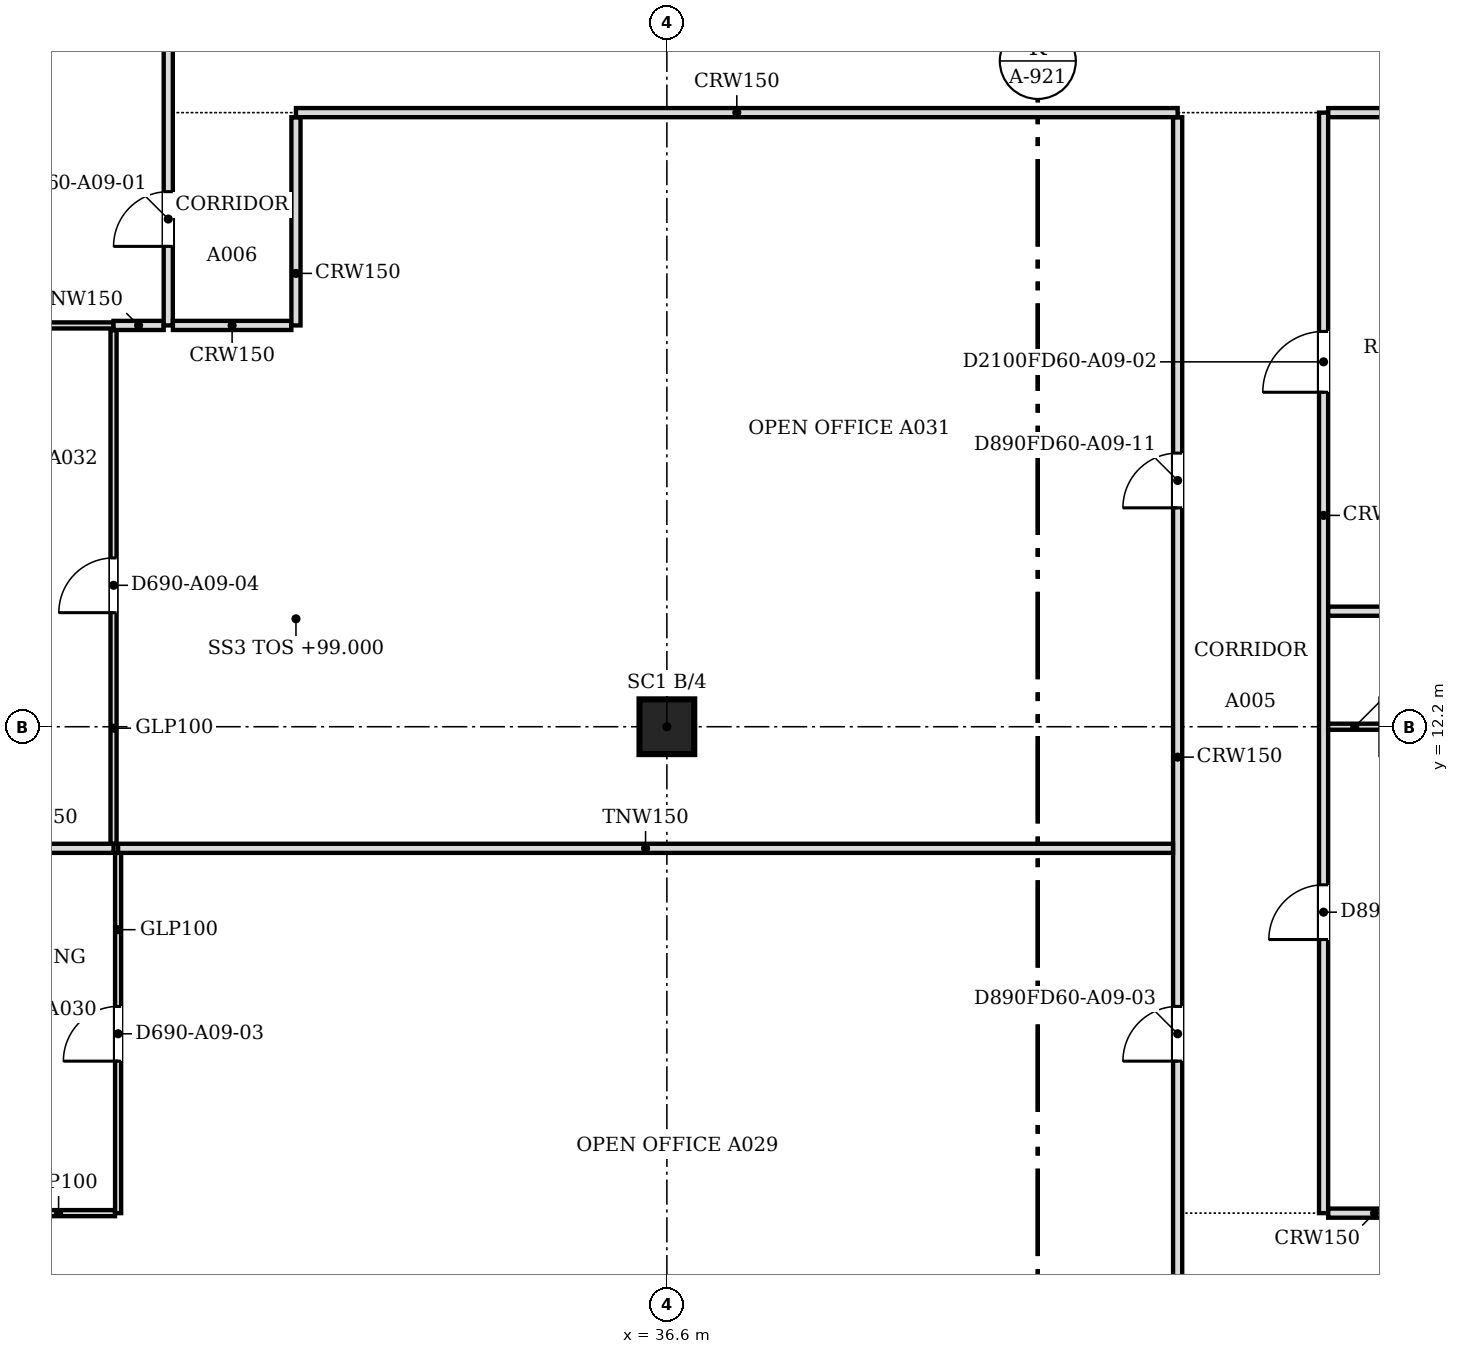
"""IFC4 building model, lengths in metres.
Left out: names, types, materials, properties, quantities, classifications, styles, units other than length and angle.
Written with IfcOpenShell. Run it as: python <this file> out.ifc"""

import sys

from ifc_helpers import new_model, si_unit, direction, frame, frame_2d, origin, origin_2d, place, context, subcontext, project, spatial, polyline, rectangle, outline, extrude, faceted_brep, source, transform, mapped, element, fill, save


model = new_model("IFC4")
c1 = context("Model", 3, precision=1e-05, world=origin(), true_north=direction((0.0, 1.0)))
c2 = subcontext(c1, "Body", "Model", "MODEL_VIEW")
j1 = project(units=[si_unit("LENGTHUNIT", "METRE"), si_unit("PLANEANGLEUNIT", "RADIAN")], contexts=[c1])
p1 = place(None, origin())
s1 = spatial("IfcSite", under=j1, at=p1, CompositionType="ELEMENT")
p2 = place(p1, origin())
s2 = spatial("IfcBuilding", under=s1, at=p2, CompositionType="ELEMENT")
p3 = place(p2, frame((0.0, 0.0, 99.0)))
s3 = spatial("IfcBuildingStorey", under=s2, at=p3, CompositionType="ELEMENT", Elevation=99.0)
p4 = place(p3, frame((36.6, 12.2, 0.0), z_axis=(0.0, 0.0, 1.0), x_axis=(1.0, 0.0, 0.0)))
e1 = element("IfcColumn", 1, at=p4, inside=s3, PredefinedType="COLUMN", context=c2, shape_type="SweptSolid", body=[
    extrude(rectangle(XDim=0.9, YDim=0.9, at=origin_2d()), origin(), (0.0, 0.0, 1.0), 3.6),
])
m1 = source(origin(), c2, "Body", "Brep", [
    faceted_brep([(0.053, -0.25, 0.0), (2.997, -0.25, 3.8), (0.053, -0.25, 7.6), (0.0, -0.25, 7.532), (0.0, -0.25, 0.068), (0.106, 0.25, 7.532), (2.944, 0.25, 3.868), (2.944, 0.25, 3.732), (0.106, 0.25, 0.068), (2.997, 0.0, 3.8), (0.053, 0.0, 0.0), (0.053, 0.0, 7.6)], [[[0, 1, 2, 3, 4]], [[5, 6, 7, 8]], [[8, 7, 9, 1, 0, 10]], [[6, 5, 11, 2, 1, 9]], [[3, 2, 11]], [[10, 0, 4]], [[8, 10, 4, 3, 11, 5]], [[9, 7, 6]]]),
])
p5 = place(p3, frame((25.675, 3.431, -3.8), z_axis=(0.0, 0.0, 1.0), x_axis=(0.707106781187, -0.707106781187, 0.0)))
e2 = element("IfcWall", 2, at=p5, inside=s3, PredefinedType="SOLIDWALL", context=c2, shape_type="MappedRepresentation", body=[
    mapped(m1, transform((0.0, 0.0, 0.0), scale=1.0)),
])
m2 = source(origin(), c2, "Body", "SweptSolid", [
    extrude(outline(polyline([(0.253, 0.666), (2.681, 3.8), (0.253, 6.934), (0.253, 0.666)])), frame((0.0, 0.26, 0.0), z_axis=(0.0, -1.0, 0.0), x_axis=(1.0, 0.0, 0.0)), (0.0, 0.0, 1.0), 0.52),
])
p6 = place(p5, origin())
e3 = element("IfcOpeningElement", 3, at=p6, cuts=e2, PredefinedType="OPENING", context=c2, shape_type="MappedRepresentation", body=[
    mapped(m2, transform((0.0, 0.0, 0.0), scale=1.0)),
])
p7 = place(p2, frame((0.0, 0.0, 102.8)))
s4 = spatial("IfcBuildingStorey", under=s2, at=p7, CompositionType="ELEMENT", Elevation=102.8)
m3 = source(origin(), c2, "Body", "Brep", [
    faceted_brep([(2.944, -0.25, 0.0), (2.997, -0.25, 0.068), (2.997, -0.25, 7.532), (2.944, -0.25, 7.6), (0.0, -0.25, 3.8), (0.053, 0.25, 3.868), (2.891, 0.25, 7.532), (2.891, 0.25, 0.068), (0.053, 0.25, 3.732), (2.944, 0.0, 0.0), (2.944, 0.0, 7.6), (0.0, 0.0, 3.8)], [[[0, 1, 2, 3, 4]], [[5, 6, 7, 8]], [[1, 0, 9]], [[10, 3, 2]], [[6, 5, 11, 4, 3, 10]], [[8, 7, 9, 0, 4, 11]], [[8, 11, 5]], [[1, 9, 7, 6, 10, 2]]]),
])
p8 = place(p7, frame((25.712, 3.394, -3.8), z_axis=(0.0, 0.0, 1.0), x_axis=(0.707066050402, -0.707147509625, 0.0)))
e4 = element("IfcWall", 4, at=p8, inside=s4, PredefinedType="SOLIDWALL", context=c2, shape_type="MappedRepresentation", body=[
    mapped(m3, transform((0.0, 0.0, 0.0), scale=1.0)),
])
m4 = source(origin(), c2, "Body", "SweptSolid", [
    extrude(outline(polyline([(2.744, 6.934), (0.316, 3.8), (2.744, 0.666), (2.744, 6.934)])), frame((0.0, 0.26, 0.0), z_axis=(0.0, -1.0, 0.0), x_axis=(1.0, 0.0, 0.0)), (0.0, 0.0, 1.0), 0.52),
])
p9 = place(p8, origin())
e5 = element("IfcOpeningElement", 5, at=p9, cuts=e4, PredefinedType="OPENING", context=c2, shape_type="MappedRepresentation", body=[
    mapped(m4, transform((0.0, 0.0, 0.0), scale=1.0)),
])
p10 = place(p3, frame((45.0, 0.5, 0.0), z_axis=(0.0, 0.0, 1.0), x_axis=(0.0, 1.0, 0.0)))
e6 = element("IfcWall", 6, at=p10, inside=s3, PredefinedType="PARTITIONING", context=c2, shape_type="SweptSolid", body=[
    extrude(rectangle(XDim=21.724, YDim=0.15, at=frame_2d((10.862, 0.0))), origin(), (0.0, 0.0, 1.0), 3.067),
])
m5 = source(origin(), c2, "Body", "SweptSolid", [
    extrude(rectangle(XDim=0.9, YDim=2.1, at=frame_2d((0.45, 1.05))), frame((0.0, 0.085, 0.0), z_axis=(0.0, -1.0, 0.0), x_axis=(1.0, 0.0, 0.0)), (0.0, 0.0, 1.0), 0.17),
])
p11 = place(p10, frame((6.2, 0.0, 0.0)))
e7 = element("IfcOpeningElement", 7, at=p11, cuts=e6, PredefinedType="OPENING", context=c2, shape_type="MappedRepresentation", body=[
    mapped(m5, transform((0.0, 0.0, 0.0), scale=1.0)),
])
p12 = place(p10, frame((15.3, 0.0, 0.0)))
e8 = element("IfcOpeningElement", 8, at=p12, cuts=e6, PredefinedType="OPENING", context=c2, shape_type="MappedRepresentation", body=[
    mapped(m5, transform((0.0, 0.0, 0.0), scale=1.0)),
])
p13 = place(p3, frame((25.669, 4.2, 0.0), z_axis=(0.0, 0.0, 1.0), x_axis=(1.0, 0.0, 0.0)))
e9 = element("IfcWall", 9, at=p13, inside=s3, PredefinedType="PARTITIONING", context=c2, shape_type="SweptSolid", body=[
    extrude(rectangle(XDim=1.855, YDim=0.1, at=frame_2d((0.928, 0.0))), origin(), (0.0, 0.0, 1.0), 3.067),
])
p14 = place(p3, frame((27.575, 4.2, 0.0), z_axis=(0.0, 0.0, 1.0), x_axis=(0.0, 1.0, 0.0)))
e10 = element("IfcWall", 10, at=p14, inside=s3, PredefinedType="PARTITIONING", context=c2, shape_type="SweptSolid", body=[
    extrude(rectangle(XDim=5.924, YDim=0.1, at=frame_2d((2.962, 0.0))), origin(), (0.0, 0.0, 1.0), 3.067),
])
m6 = source(origin(), c2, "Body", "SweptSolid", [
    extrude(rectangle(XDim=0.9, YDim=2.1, at=frame_2d((0.45, 1.05))), frame((0.0, 0.06, 0.0), z_axis=(0.0, -1.0, 0.0), x_axis=(1.0, 0.0, 0.0)), (0.0, 0.0, 1.0), 0.12),
])
p15 = place(p14, frame((2.5, 0.0, 0.0)))
e11 = element("IfcOpeningElement", 11, at=p15, cuts=e10, PredefinedType="OPENING", context=c2, shape_type="MappedRepresentation", body=[
    mapped(m6, transform((0.0, 0.0, 0.0), scale=1.0)),
])
p16 = place(p3, frame((47.4, 22.3, 0.0), z_axis=(0.0, 0.0, 1.0), x_axis=(0.0, -1.0, 0.0)))
e12 = element("IfcWall", 12, at=p16, inside=s3, PredefinedType="PARTITIONING", context=c2, shape_type="SweptSolid", body=[
    extrude(rectangle(XDim=18.1, YDim=0.15, at=frame_2d((9.05, 0.0))), origin(), (0.0, 0.0, 1.0), 3.067),
])
m7 = source(origin(), c2, "Body", "SweptSolid", [
    extrude(rectangle(XDim=1.0, YDim=2.1, at=frame_2d((0.5, 1.05))), frame((0.0, 0.085, 0.0), z_axis=(0.0, -1.0, 0.0), x_axis=(1.0, 0.0, 0.0)), (0.0, 0.0, 1.0), 0.17),
])
p17 = place(p16, frame((3.599, 0.0, 0.0)))
e13 = element("IfcOpeningElement", 13, at=p17, cuts=e12, PredefinedType="OPENING", context=c2, shape_type="MappedRepresentation", body=[
    mapped(m7, transform((0.0, 0.0, 0.0), scale=1.0)),
])
p18 = place(p16, frame((12.7, 0.0, 0.0)))
e14 = element("IfcOpeningElement", 14, at=p18, cuts=e12, PredefinedType="OPENING", context=c2, shape_type="MappedRepresentation", body=[
    mapped(m5, transform((0.0, 0.0, 0.0), scale=1.0)),
])
p19 = place(p3, frame((47.476, 4.2, 0.0), z_axis=(0.0, 0.0, 1.0), x_axis=(1.0, 0.0, 0.0)))
e15 = element("IfcWall", 15, at=p19, inside=s3, PredefinedType="PARTITIONING", context=c2, shape_type="SweptSolid", body=[
    extrude(rectangle(XDim=1.524, YDim=0.15, at=frame_2d((0.762, 0.0))), origin(), (0.0, 0.0, 1.0), 3.067),
])
p20 = place(p3, frame((24.9, 10.2, 0.0), z_axis=(0.0, 0.0, 1.0), x_axis=(1.0, 0.0, 0.0)))
e16 = element("IfcWall", 16, at=p20, inside=s3, PredefinedType="PARTITIONING", context=c2, shape_type="SweptSolid", body=[
    extrude(rectangle(XDim=2.6, YDim=0.15, at=frame_2d((1.3, 0.0))), origin(), (0.0, 0.0, 1.0), 3.067),
])
p21 = place(p3, frame((27.575, 10.2, 0.0), z_axis=(0.0, 0.0, 1.0), x_axis=(1.0, 0.0, 0.0)))
e17 = element("IfcWall", 17, at=p21, inside=s3, PredefinedType="PARTITIONING", context=c2, shape_type="SweptSolid", body=[
    extrude(rectangle(XDim=17.349, YDim=0.15, at=frame_2d((8.675, 0.0))), origin(), (0.0, 0.0, 1.0), 3.067),
])
p22 = place(p3, frame((27.5, 10.276, 0.0), z_axis=(0.0, 0.0, 1.0), x_axis=(0.0, 1.0, 0.0)))
e18 = element("IfcWall", 18, at=p22, inside=s3, PredefinedType="PARTITIONING", context=c2, shape_type="SweptSolid", body=[
    extrude(rectangle(XDim=8.448, YDim=0.1, at=frame_2d((4.224, 0.0))), origin(), (0.0, 0.0, 1.0), 3.067),
])
p23 = place(p22, frame((3.8, 0.0, 0.0)))
e19 = element("IfcOpeningElement", 19, at=p23, cuts=e18, PredefinedType="OPENING", context=c2, shape_type="MappedRepresentation", body=[
    mapped(m6, transform((0.0, 0.0, 0.0), scale=1.0)),
])
p24 = place(p3, frame((48.35, 12.2, 0.0), z_axis=(0.0, 0.0, 1.0), x_axis=(-1.0, 0.0, 0.0)))
e20 = element("IfcWall", 20, at=p24, inside=s3, PredefinedType="PARTITIONING", context=c2, shape_type="SweptSolid", body=[
    extrude(rectangle(XDim=0.875, YDim=0.1, at=frame_2d((0.438, 0.0))), origin(), (0.0, 0.0, 1.0), 3.067),
])
p25 = place(p3, frame((47.476, 14.1, 0.0), z_axis=(0.0, 0.0, 1.0), x_axis=(1.0, 0.0, 0.0)))
e21 = element("IfcWall", 21, at=p25, inside=s3, PredefinedType="PARTITIONING", context=c2, shape_type="SweptSolid", body=[
    extrude(rectangle(XDim=3.198, YDim=0.15, at=frame_2d((1.599, 0.0))), origin(), (0.0, 0.0, 1.0), 3.067),
])
p26 = place(p3, frame((22.0, 18.8, 0.0), z_axis=(0.0, 0.0, 1.0), x_axis=(1.0, 0.0, 0.0)))
e22 = element("IfcWall", 22, at=p26, inside=s3, PredefinedType="PARTITIONING", context=c2, shape_type="SweptSolid", body=[
    extrude(rectangle(XDim=5.499, YDim=0.1, at=frame_2d((2.75, 0.0))), origin(), (0.0, 0.0, 1.0), 3.067),
])
p27 = place(p3, frame((27.5, 18.8, 0.0), z_axis=(0.0, 0.0, 1.0), x_axis=(1.0, 0.0, 0.0)))
e23 = element("IfcWall", 23, at=p27, inside=s3, PredefinedType="PARTITIONING", context=c2, shape_type="SweptSolid", body=[
    extrude(rectangle(XDim=0.824, YDim=0.15, at=frame_2d((0.412, 0.0))), origin(), (0.0, 0.0, 1.0), 3.067),
])
p28 = place(p3, frame((28.4, 18.8, 0.0), z_axis=(0.0, 0.0, 1.0), x_axis=(0.0, 1.0, 0.0)))
e24 = element("IfcWall", 24, at=p28, inside=s3, PredefinedType="PARTITIONING", context=c2, shape_type="SweptSolid", body=[
    extrude(rectangle(XDim=26.824, YDim=0.15, at=frame_2d((13.412, 0.0))), origin(), (0.0, 0.0, 1.0), 3.067),
])
p29 = place(p28, frame((1.3, 0.0, 0.0)))
e25 = element("IfcOpeningElement", 25, at=p29, cuts=e24, PredefinedType="OPENING", context=c2, shape_type="MappedRepresentation", body=[
    mapped(m5, transform((0.0, 0.0, 0.0), scale=1.0)),
])
p30 = place(p28, frame((23.351, 0.0, 0.0)))
e26 = element("IfcOpeningElement", 26, at=p30, cuts=e24, PredefinedType="OPENING", context=c2, shape_type="MappedRepresentation", body=[
    mapped(m7, transform((0.0, 0.0, 0.0), scale=1.0)),
])
p31 = place(p28, frame((8.2, 0.0, 0.0)))
e27 = element("IfcOpeningElement", 27, at=p31, cuts=e24, PredefinedType="OPENING", context=c2, shape_type="MappedRepresentation", body=[
    mapped(m5, transform((0.0, 0.0, 0.0), scale=1.0)),
])
p32 = place(p28, frame((15.8, 0.0, 0.0)))
e28 = element("IfcOpeningElement", 28, at=p32, cuts=e24, PredefinedType="OPENING", context=c2, shape_type="MappedRepresentation", body=[
    mapped(m7, transform((0.0, 0.0, 0.0), scale=1.0)),
])
p33 = place(p3, frame((28.476, 18.8, 0.0), z_axis=(0.0, 0.0, 1.0), x_axis=(1.0, 0.0, 0.0)))
e29 = element("IfcWall", 29, at=p33, inside=s3, PredefinedType="PARTITIONING", context=c2, shape_type="SweptSolid", body=[
    extrude(rectangle(XDim=1.948, YDim=0.15, at=frame_2d((0.974, 0.0))), origin(), (0.0, 0.0, 1.0), 3.067),
])
p34 = place(p3, frame((30.5, 18.8, 0.0), z_axis=(0.0, 0.0, 1.0), x_axis=(0.0, 1.0, 0.0)))
e30 = element("IfcWall", 30, at=p34, inside=s3, PredefinedType="PARTITIONING", context=c2, shape_type="SweptSolid", body=[
    extrude(rectangle(XDim=3.424, YDim=0.15, at=frame_2d((1.712, 0.0))), origin(), (0.0, 0.0, 1.0), 3.067),
])
p35 = place(p3, frame((30.5, 22.3, 0.0), z_axis=(0.0, 0.0, 1.0), x_axis=(1.0, 0.0, 0.0)))
e31 = element("IfcWall", 31, at=p35, inside=s3, PredefinedType="PARTITIONING", context=c2, shape_type="SweptSolid", body=[
    extrude(rectangle(XDim=14.5, YDim=0.15, at=frame_2d((7.25, 0.0))), origin(), (0.0, 0.0, 1.0), 3.067),
])
p36 = place(p3, frame((47.476, 22.3, 0.0), z_axis=(0.0, 0.0, 1.0), x_axis=(1.0, 0.0, 0.0)))
e32 = element("IfcWall", 32, at=p36, inside=s3, PredefinedType="PARTITIONING", context=c2, shape_type="SweptSolid", body=[
    extrude(rectangle(XDim=9.448, YDim=0.15, at=frame_2d((4.724, 0.0))), origin(), (0.0, 0.0, 1.0), 3.067),
])
m8 = source(origin(), c2, "Body", "SweptSolid", [
    extrude(rectangle(XDim=0.9, YDim=2.1, at=frame_2d((0.45, 1.05))), frame((0.0, 0.025, 0.0), z_axis=(0.0, -1.0, 0.0), x_axis=(1.0, 0.0, 0.0)), (0.0, 0.0, 1.0), 0.05),
])
p37 = place(p29, origin())
e33 = element("IfcDoor", 33, at=p37, inside=s3, OperationType="SINGLE_SWING_LEFT", PredefinedType="DOOR", context=c2, shape_type="MappedRepresentation", body=[
    mapped(m8, transform((0.0, 0.0, 0.0), scale=1.0)),
])
fill(e25, e33)
p38 = place(p11, origin())
e34 = element("IfcDoor", 34, at=p38, inside=s3, OperationType="SINGLE_SWING_LEFT", PredefinedType="DOOR", context=c2, shape_type="MappedRepresentation", body=[
    mapped(m8, transform((0.0, 0.0, 0.0), scale=1.0)),
])
fill(e7, e34)
p39 = place(p15, origin())
e35 = element("IfcDoor", 35, at=p39, inside=s3, OperationType="SINGLE_SWING_LEFT", PredefinedType="DOOR", context=c2, shape_type="MappedRepresentation", body=[
    mapped(m8, transform((0.0, 0.0, 0.0), scale=1.0)),
])
fill(e11, e35)
m9 = source(origin(), c2, "Body", "SweptSolid", [
    extrude(rectangle(XDim=1.0, YDim=2.1, at=frame_2d((0.5, 1.05))), frame((0.0, 0.025, 0.0), z_axis=(0.0, -1.0, 0.0), x_axis=(1.0, 0.0, 0.0)), (0.0, 0.0, 1.0), 0.05),
])
p40 = place(p17, origin())
e36 = element("IfcDoor", 36, at=p40, inside=s3, OperationType="SINGLE_SWING_RIGHT", PredefinedType="DOOR", context=c2, shape_type="MappedRepresentation", body=[
    mapped(m9, transform((0.0, 0.0, 0.0), scale=1.0)),
])
fill(e13, e36)
p41 = place(p23, origin())
e37 = element("IfcDoor", 37, at=p41, inside=s3, OperationType="SINGLE_SWING_LEFT", PredefinedType="DOOR", context=c2, shape_type="MappedRepresentation", body=[
    mapped(m8, transform((0.0, 0.0, 0.0), scale=1.0)),
])
fill(e19, e37)
p42 = place(p18, origin())
e38 = element("IfcDoor", 38, at=p42, inside=s3, OperationType="SINGLE_SWING_RIGHT", PredefinedType="DOOR", context=c2, shape_type="MappedRepresentation", body=[
    mapped(m8, transform((0.0, 0.0, 0.0), scale=1.0)),
])
fill(e14, e38)
p43 = place(p12, origin())
e39 = element("IfcDoor", 39, at=p43, inside=s3, OperationType="SINGLE_SWING_LEFT", PredefinedType="DOOR", context=c2, shape_type="MappedRepresentation", body=[
    mapped(m8, transform((0.0, 0.0, 0.0), scale=1.0)),
])
fill(e8, e39)
save(model, sys.argv[1])
